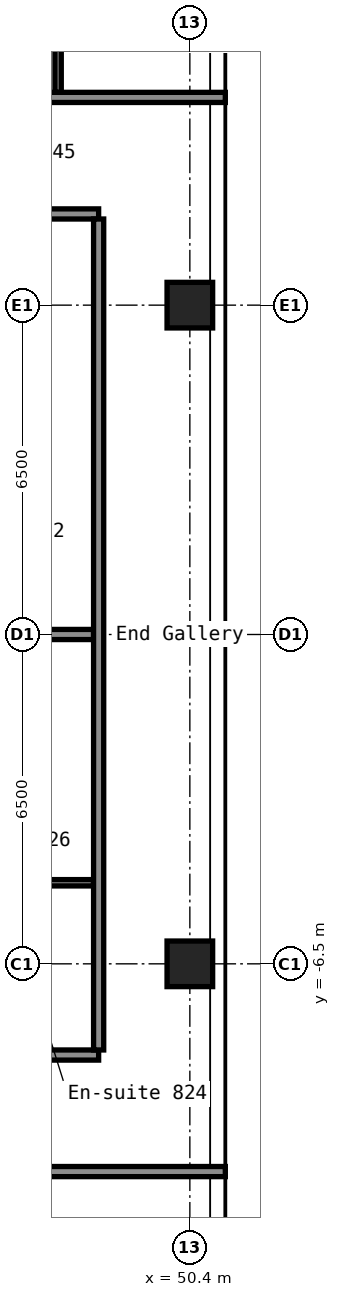
"""IFC4 building model, lengths in metres.
Left out: names, types, materials, properties, quantities, classifications, styles, units other than length and angle.
Written with IfcOpenShell. Run it as: python <this file> out.ifc"""

import sys

from ifc_helpers import new_model, si_unit, direction, frame, frame_2d, origin, origin_2d, place, context, subcontext, project, spatial, rectangle, hollow_rectangle, extrude, element, save


model = new_model("IFC4")
c1 = context("Model", 3, precision=1e-05, world=origin(), true_north=direction((0.0, 1.0)))
c2 = subcontext(c1, "Body", "Model", "MODEL_VIEW")
j1 = project(units=[si_unit("LENGTHUNIT", "METRE"), si_unit("PLANEANGLEUNIT", "RADIAN")], contexts=[c1])
p1 = place(None, origin())
s1 = spatial("IfcSite", under=j1, at=p1, CompositionType="ELEMENT")
p2 = place(p1, origin())
s2 = spatial("IfcBuilding", under=s1, at=p2, CompositionType="ELEMENT")
p3 = place(p2, frame((0.0, 0.0, 32.6)))
s3 = spatial("IfcBuildingStorey", under=s2, at=p3, CompositionType="ELEMENT", Elevation=32.6)
for number, where, z_axis, x_axis in (
    (1, (50.4, -6.5, 0.0), (0.0, 0.0, 1.0), (1.0, 0.0, 0.0)),
    (2, (50.4, 6.5, 0.0), (0.0, 0.0, 1.0), (1.0, 0.0, 0.0)),
):
    element("IfcColumn", number, at=place(p3, frame(where, z_axis=z_axis, x_axis=x_axis)), inside=s3, PredefinedType="COLUMN", context=c2, shape_type="SweptSolid", body=[
        extrude(hollow_rectangle(XDim=0.9, YDim=0.9, WallThickness=0.036, at=origin_2d()), origin(), (0.0, 0.0, 1.0), 2.8),
    ])
p4 = place(p3, frame((16.8, -10.6, 0.0), z_axis=(0.0, 0.0, 1.0), x_axis=(1.0, 0.0, 0.0)))
e3 = element("IfcWall", 3, at=p4, inside=s3, PredefinedType="PARTITIONING", context=c2, shape_type="SweptSolid", body=[
    extrude(rectangle(XDim=34.3, YDim=0.2, at=frame_2d((17.15, 0.0))), origin(), (0.0, 0.0, 1.0), 2.8),
])
p5 = place(p4, frame((3.4, 0.0, 0.0)))
e4 = element("IfcOpeningElement", 4, at=p5, cuts=e3, PredefinedType="OPENING", context=c2, shape_type="SweptSolid", body=[
    extrude(rectangle(XDim=1.6, YDim=2.1, at=frame_2d((0.8, 1.05))), frame((0.0, 0.11, 0.0), z_axis=(0.0, -1.0, 0.0), x_axis=(1.0, 0.0, 0.0)), (0.0, 0.0, 1.0), 0.22),
])
p6 = place(p4, frame((11.8, 0.0, 0.0)))
e5 = element("IfcOpeningElement", 5, at=p6, cuts=e3, PredefinedType="OPENING", context=c2, shape_type="SweptSolid", body=[
    extrude(rectangle(XDim=1.6, YDim=2.1, at=frame_2d((0.8, 1.05))), frame((0.0, 0.11, 0.0), z_axis=(0.0, -1.0, 0.0), x_axis=(1.0, 0.0, 0.0)), (0.0, 0.0, 1.0), 0.22),
])
p7 = place(p4, frame((20.2, 0.0, 0.0)))
e6 = element("IfcOpeningElement", 6, at=p7, cuts=e3, PredefinedType="OPENING", context=c2, shape_type="SweptSolid", body=[
    extrude(rectangle(XDim=1.6, YDim=2.1, at=frame_2d((0.8, 1.05))), frame((0.0, 0.11, 0.0), z_axis=(0.0, -1.0, 0.0), x_axis=(1.0, 0.0, 0.0)), (0.0, 0.0, 1.0), 0.22),
])
p8 = place(p4, frame((28.8, 0.0, 0.0)))
e7 = element("IfcOpeningElement", 7, at=p8, cuts=e3, PredefinedType="OPENING", context=c2, shape_type="SweptSolid", body=[
    extrude(rectangle(XDim=1.6, YDim=2.1, at=frame_2d((0.8, 1.05))), frame((0.0, 0.11, 0.0), z_axis=(0.0, -1.0, 0.0), x_axis=(1.0, 0.0, 0.0)), (0.0, 0.0, 1.0), 0.22),
])
p9 = place(p3, frame((33.6, -8.3, 0.0), z_axis=(0.0, 0.0, 1.0), x_axis=(1.0, 0.0, 0.0)))
e8 = element("IfcWall", 8, at=p9, inside=s3, PredefinedType="PARTITIONING", context=c2, shape_type="SweptSolid", body=[
    extrude(rectangle(XDim=15.0, YDim=0.2, at=frame_2d((7.5, 0.0))), origin(), (0.0, 0.0, 1.0), 2.8),
])
p10 = place(p9, frame((2.85, 0.0, 0.0)))
e9 = element("IfcOpeningElement", 9, at=p10, cuts=e8, PredefinedType="OPENING", context=c2, shape_type="SweptSolid", body=[
    extrude(rectangle(XDim=1.0, YDim=2.1, at=frame_2d((0.5, 1.05))), frame((0.0, 0.11, 0.0), z_axis=(0.0, -1.0, 0.0), x_axis=(1.0, 0.0, 0.0)), (0.0, 0.0, 1.0), 0.22),
])
p11 = place(p9, frame((4.55, 0.0, 0.0)))
e10 = element("IfcOpeningElement", 10, at=p11, cuts=e8, PredefinedType="OPENING", context=c2, shape_type="SweptSolid", body=[
    extrude(rectangle(XDim=1.0, YDim=2.1, at=frame_2d((0.5, 1.05))), frame((0.0, 0.11, 0.0), z_axis=(0.0, -1.0, 0.0), x_axis=(1.0, 0.0, 0.0)), (0.0, 0.0, 1.0), 0.22),
])
p12 = place(p9, frame((9.5, 0.0, 0.0)))
e11 = element("IfcOpeningElement", 11, at=p12, cuts=e8, PredefinedType="OPENING", context=c2, shape_type="SweptSolid", body=[
    extrude(rectangle(XDim=1.0, YDim=2.1, at=frame_2d((0.5, 1.05))), frame((0.0, 0.11, 0.0), z_axis=(0.0, -1.0, 0.0), x_axis=(1.0, 0.0, 0.0)), (0.0, 0.0, 1.0), 0.22),
])
p13 = place(p3, frame((45.262, -4.9, 0.0), z_axis=(0.0, 0.0, 1.0), x_axis=(1.0, 0.0, 0.0)))
e12 = element("IfcWall", 12, at=p13, inside=s3, PredefinedType="PARTITIONING", context=c2, shape_type="SweptSolid", body=[
    extrude(rectangle(XDim=3.238, YDim=0.125, at=frame_2d((1.619, 0.0))), origin(), (0.0, 0.0, 1.0), 2.8),
])
p14 = place(p13, frame((1.238, 0.0, 0.0)))
e13 = element("IfcOpeningElement", 13, at=p14, cuts=e12, PredefinedType="OPENING", context=c2, shape_type="SweptSolid", body=[
    extrude(rectangle(XDim=0.8, YDim=2.1, at=frame_2d((0.4, 1.05))), frame((0.0, 0.073, 0.0), z_axis=(0.0, -1.0, 0.0), x_axis=(1.0, 0.0, 0.0)), (0.0, 0.0, 1.0), 0.145),
])
p15 = place(p3, frame((33.6, 0.0, 0.0), z_axis=(0.0, 0.0, 1.0), x_axis=(1.0, 0.0, 0.0)))
e14 = element("IfcWall", 14, at=p15, inside=s3, PredefinedType="PARTITIONING", context=c2, shape_type="SweptSolid", body=[
    extrude(rectangle(XDim=14.9, YDim=0.2, at=frame_2d((7.45, 0.0))), origin(), (0.0, 0.0, 1.0), 2.8),
])
p16 = place(p3, frame((33.6, 8.3, 0.0), z_axis=(0.0, 0.0, 1.0), x_axis=(1.0, 0.0, 0.0)))
e15 = element("IfcWall", 15, at=p16, inside=s3, PredefinedType="PARTITIONING", context=c2, shape_type="SweptSolid", body=[
    extrude(rectangle(XDim=15.0, YDim=0.2, at=frame_2d((7.5, 0.0))), origin(), (0.0, 0.0, 1.0), 2.8),
])
p17 = place(p16, frame((2.85, 0.0, 0.0)))
e16 = element("IfcOpeningElement", 16, at=p17, cuts=e15, PredefinedType="OPENING", context=c2, shape_type="SweptSolid", body=[
    extrude(rectangle(XDim=1.0, YDim=2.1, at=frame_2d((0.5, 1.05))), frame((0.0, 0.11, 0.0), z_axis=(0.0, -1.0, 0.0), x_axis=(1.0, 0.0, 0.0)), (0.0, 0.0, 1.0), 0.22),
])
p18 = place(p16, frame((4.55, 0.0, 0.0)))
e17 = element("IfcOpeningElement", 17, at=p18, cuts=e15, PredefinedType="OPENING", context=c2, shape_type="SweptSolid", body=[
    extrude(rectangle(XDim=1.0, YDim=2.1, at=frame_2d((0.5, 1.05))), frame((0.0, 0.11, 0.0), z_axis=(0.0, -1.0, 0.0), x_axis=(1.0, 0.0, 0.0)), (0.0, 0.0, 1.0), 0.22),
])
p19 = place(p16, frame((12.9, 0.0, 0.0)))
e18 = element("IfcOpeningElement", 18, at=p19, cuts=e15, PredefinedType="OPENING", context=c2, shape_type="SweptSolid", body=[
    extrude(rectangle(XDim=1.0, YDim=2.1, at=frame_2d((0.5, 1.05))), frame((0.0, 0.11, 0.0), z_axis=(0.0, -1.0, 0.0), x_axis=(1.0, 0.0, 0.0)), (0.0, 0.0, 1.0), 0.22),
])
p20 = place(p3, frame((16.8, 10.6, 0.0), z_axis=(0.0, 0.0, 1.0), x_axis=(1.0, 0.0, 0.0)))
e19 = element("IfcWall", 19, at=p20, inside=s3, PredefinedType="PARTITIONING", context=c2, shape_type="SweptSolid", body=[
    extrude(rectangle(XDim=34.3, YDim=0.2, at=frame_2d((17.15, 0.0))), origin(), (0.0, 0.0, 1.0), 2.8),
])
p21 = place(p20, frame((1.6, 0.0, 0.0)))
e20 = element("IfcOpeningElement", 20, at=p21, cuts=e19, PredefinedType="OPENING", context=c2, shape_type="SweptSolid", body=[
    extrude(rectangle(XDim=1.0, YDim=2.1, at=frame_2d((0.5, 1.05))), frame((0.0, 0.11, 0.0), z_axis=(0.0, -1.0, 0.0), x_axis=(1.0, 0.0, 0.0)), (0.0, 0.0, 1.0), 0.22),
])
p22 = place(p20, frame((10.0, 0.0, 0.0)))
e21 = element("IfcOpeningElement", 21, at=p22, cuts=e19, PredefinedType="OPENING", context=c2, shape_type="SweptSolid", body=[
    extrude(rectangle(XDim=1.0, YDim=2.1, at=frame_2d((0.5, 1.05))), frame((0.0, 0.11, 0.0), z_axis=(0.0, -1.0, 0.0), x_axis=(1.0, 0.0, 0.0)), (0.0, 0.0, 1.0), 0.22),
])
p23 = place(p20, frame((18.4, 0.0, 0.0)))
e22 = element("IfcOpeningElement", 22, at=p23, cuts=e19, PredefinedType="OPENING", context=c2, shape_type="SweptSolid", body=[
    extrude(rectangle(XDim=1.0, YDim=2.1, at=frame_2d((0.5, 1.05))), frame((0.0, 0.11, 0.0), z_axis=(0.0, -1.0, 0.0), x_axis=(1.0, 0.0, 0.0)), (0.0, 0.0, 1.0), 0.22),
])
p24 = place(p20, frame((26.9, 0.0, 0.0)))
e23 = element("IfcOpeningElement", 23, at=p24, cuts=e19, PredefinedType="OPENING", context=c2, shape_type="SweptSolid", body=[
    extrude(rectangle(XDim=1.0, YDim=2.1, at=frame_2d((0.5, 1.05))), frame((0.0, 0.11, 0.0), z_axis=(0.0, -1.0, 0.0), x_axis=(1.0, 0.0, 0.0)), (0.0, 0.0, 1.0), 0.22),
])
p25 = place(p3, frame((47.8, 10.7, 0.0), z_axis=(0.0, 0.0, 1.0), x_axis=(0.0, 1.0, 0.0)))
e24 = element("IfcWall", 24, at=p25, inside=s3, PredefinedType="PARTITIONING", context=c2, shape_type="SweptSolid", body=[
    extrude(rectangle(XDim=3.1, YDim=0.125, at=frame_2d((1.55, 0.0))), origin(), (0.0, 0.0, 1.0), 2.8),
])
p26 = place(p3, frame((48.6, -8.2, 0.0), z_axis=(0.0, 0.0, 1.0), x_axis=(0.0, 1.0, 0.0)))
e25 = element("IfcWall", 25, at=p26, inside=s3, PredefinedType="PARTITIONING", context=c2, shape_type="SweptSolid", body=[
    extrude(rectangle(XDim=16.4, YDim=0.2, at=frame_2d((8.2, 0.0))), origin(), (0.0, 0.0, 1.0), 2.8),
])
save(model, sys.argv[1])
